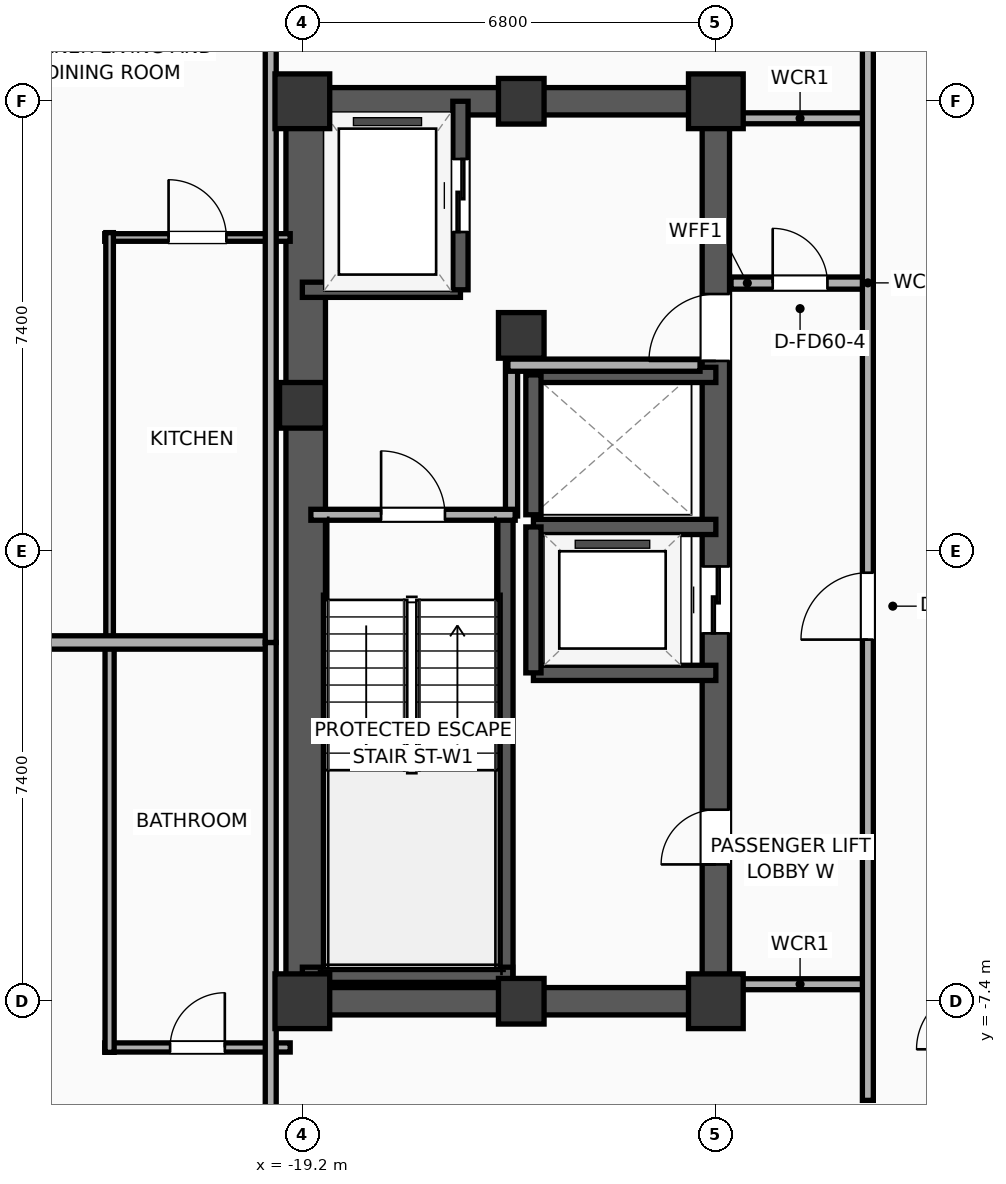
"""IFC4 building model, lengths in metres.
Left out: names, types, materials, properties, quantities, classifications, styles, units other than length and angle.
Written with IfcOpenShell. Run it as: python <this file> out.ifc"""

import sys

from ifc_helpers import new_model, si_unit, direction, frame, frame_2d, origin, origin_2d, place, context, subcontext, project, spatial, rectangle, extrude, element, fill, save


model = new_model("IFC4")
c1 = context("Model", 3, precision=1e-05, world=origin(), true_north=direction((0.0, 1.0)))
c2 = subcontext(c1, "Body", "Model", "MODEL_VIEW")
j1 = project(units=[si_unit("LENGTHUNIT", "METRE"), si_unit("PLANEANGLEUNIT", "RADIAN")], contexts=[c1])
p1 = place(None, origin())
s1 = spatial("IfcSite", under=j1, at=p1, CompositionType="ELEMENT")
p2 = place(p1, origin())
s2 = spatial("IfcBuilding", under=s1, at=p2, CompositionType="ELEMENT")
p3 = place(p2, frame((0.0, 0.0, 163.8)))
s3 = spatial("IfcBuildingStorey", under=s2, at=p3, CompositionType="ELEMENT", Elevation=163.8)
p4 = place(p3, frame((-19.2, -7.4, 0.0), z_axis=(0.0, 0.0, 1.0), x_axis=(1.0, 0.0, 0.0)))
e1 = element("IfcColumn", 1, at=p4, inside=s3, PredefinedType="COLUMN", context=c2, shape_type="SweptSolid", body=[
    extrude(rectangle(XDim=0.9, YDim=0.9, at=origin_2d()), origin(), (0.0, 0.0, 1.0), 3.9),
])
p5 = place(p3, frame((-19.2, 2.4, 0.0), z_axis=(0.0, 0.0, 1.0), x_axis=(1.0, 0.0, 0.0)))
e2 = element("IfcColumn", 2, at=p5, inside=s3, PredefinedType="COLUMN", context=c2, shape_type="SweptSolid", body=[
    extrude(rectangle(XDim=0.75, YDim=0.75, at=origin_2d()), origin(), (0.0, 0.0, 1.0), 3.9),
])
p6 = place(p3, frame((-19.2, 7.4, 0.0), z_axis=(0.0, 0.0, 1.0), x_axis=(1.0, 0.0, 0.0)))
e3 = element("IfcColumn", 3, at=p6, inside=s3, PredefinedType="COLUMN", context=c2, shape_type="SweptSolid", body=[
    extrude(rectangle(XDim=0.9, YDim=0.9, at=origin_2d()), origin(), (0.0, 0.0, 1.0), 3.9),
])
for number, where, z_axis, x_axis in (
    (4, (-15.6, -7.4, 0.0), (0.0, 0.0, 1.0), (1.0, 0.0, 0.0)),
    (5, (-15.6, 7.4, 0.0), (0.0, 0.0, 1.0), (1.0, 0.0, 0.0)),
):
    element("IfcColumn", number, at=place(p3, frame(where, z_axis=z_axis, x_axis=x_axis)), inside=s3, PredefinedType="COLUMN", context=c2, shape_type="SweptSolid", body=[
        extrude(rectangle(XDim=0.75, YDim=0.75, at=origin_2d()), origin(), (0.0, 0.0, 1.0), 3.9),
    ])
p7 = place(p3, frame((-12.4, -7.4, 0.0), z_axis=(0.0, 0.0, 1.0), x_axis=(1.0, 0.0, 0.0)))
e6 = element("IfcColumn", 6, at=p7, inside=s3, PredefinedType="COLUMN", context=c2, shape_type="SweptSolid", body=[
    extrude(rectangle(XDim=0.9, YDim=0.9, at=origin_2d()), origin(), (0.0, 0.0, 1.0), 3.9),
])
p8 = place(p3, frame((-15.6, 3.55, 0.0), z_axis=(0.0, 0.0, 1.0), x_axis=(1.0, 0.0, 0.0)))
e7 = element("IfcColumn", 7, at=p8, inside=s3, PredefinedType="COLUMN", context=c2, shape_type="SweptSolid", body=[
    extrude(rectangle(XDim=0.75, YDim=0.75, at=origin_2d()), origin(), (0.0, 0.0, 1.0), 3.9),
])
p9 = place(p3, frame((-12.4, 7.4, 0.0), z_axis=(0.0, 0.0, 1.0), x_axis=(1.0, 0.0, 0.0)))
e8 = element("IfcColumn", 8, at=p9, inside=s3, PredefinedType="COLUMN", context=c2, shape_type="SweptSolid", body=[
    extrude(rectangle(XDim=0.9, YDim=0.9, at=origin_2d()), origin(), (0.0, 0.0, 1.0), 3.9),
])
for number, where, z_axis, x_axis in (
    (9, (-19.425, -7.4, 0.0), (0.0, 0.0, 1.0), (1.0, 0.0, 0.0)),
    (10, (-19.425, 7.4, 0.0), (0.0, 0.0, 1.0), (1.0, 0.0, 0.0)),
):
    element("IfcWall", number, at=place(p3, frame(where, z_axis=z_axis, x_axis=x_axis)), inside=s3, PredefinedType="SHEAR", context=c2, shape_type="SweptSolid", body=[
        extrude(rectangle(XDim=7.25, YDim=0.45, at=frame_2d((3.625, 0.0))), origin(), (0.0, 0.0, 1.0), 3.65),
    ])
p10 = place(p3, frame((-19.145, -7.4, 0.0), z_axis=(0.0, 0.0, 1.0), x_axis=(0.0, 1.0, 0.0)))
e11 = element("IfcWall", 11, at=p10, inside=s3, PredefinedType="SHEAR", context=c2, shape_type="SweptSolid", body=[
    extrude(rectangle(XDim=14.8, YDim=0.65, at=frame_2d((7.4, 0.0))), origin(), (0.0, 0.0, 1.0), 3.65),
])
p11 = place(p3, frame((-12.4, -7.4, 0.0), z_axis=(0.0, 0.0, 1.0), x_axis=(0.0, 1.0, 0.0)))
e12 = element("IfcWall", 12, at=p11, inside=s3, PredefinedType="SHEAR", context=c2, shape_type="SweptSolid", body=[
    extrude(rectangle(XDim=14.8, YDim=0.45, at=frame_2d((7.4, 0.0))), origin(), (0.0, 0.0, 1.0), 3.65),
])
p12 = place(p11, frame((6.05, 0.0, 0.0)))
e13 = element("IfcOpeningElement", 13, at=p12, cuts=e12, PredefinedType="OPENING", context=c2, shape_type="SweptSolid", body=[
    extrude(rectangle(XDim=1.1, YDim=2.05, at=frame_2d((0.55, 1.025))), frame((0.0, 0.235, 0.0), z_axis=(0.0, -1.0, 0.0), x_axis=(1.0, 0.0, 0.0)), (0.0, 0.0, 1.0), 0.47),
])
p13 = place(p11, frame((10.53, 0.0, 0.0)))
e14 = element("IfcOpeningElement", 14, at=p13, cuts=e12, PredefinedType="OPENING", context=c2, shape_type="SweptSolid", body=[
    extrude(rectangle(XDim=1.1, YDim=2.05, at=frame_2d((0.55, 1.025))), frame((0.0, 0.235, 0.0), z_axis=(0.0, -1.0, 0.0), x_axis=(1.0, 0.0, 0.0)), (0.0, 0.0, 1.0), 0.47),
])
p14 = place(p11, frame((2.25, 0.0, 0.0)))
e15 = element("IfcOpeningElement", 15, at=p14, cuts=e12, PredefinedType="OPENING", context=c2, shape_type="SweptSolid", body=[
    extrude(rectangle(XDim=0.9, YDim=2.05, at=frame_2d((0.45, 1.025))), frame((0.0, 0.235, 0.0), z_axis=(0.0, -1.0, 0.0), x_axis=(1.0, 0.0, 0.0)), (0.0, 0.0, 1.0), 0.47),
])
p15 = place(p3, frame((-15.86, -7.085, 0.0), z_axis=(0.0, 0.0, 1.0), x_axis=(0.0, 1.0, 0.0)))
e16 = element("IfcWall", 16, at=p15, inside=s3, PredefinedType="SOLIDWALL", context=c2, shape_type="SweptSolid", body=[
    extrude(rectangle(XDim=7.685, YDim=0.25, at=frame_2d((3.843, 0.0))), origin(), (0.0, 0.0, 1.0), 3.65),
])
p16 = place(p3, frame((-19.2, -6.965, 0.0), z_axis=(0.0, 0.0, 1.0), x_axis=(1.0, 0.0, 0.0)))
e17 = element("IfcWall", 17, at=p16, inside=s3, PredefinedType="SOLIDWALL", context=c2, shape_type="SweptSolid", body=[
    extrude(rectangle(XDim=3.46, YDim=0.25, at=frame_2d((1.73, 0.0))), origin(), (0.0, 0.0, 1.0), 3.65),
])
p17 = place(p3, frame((-19.2, 4.3, 0.0), z_axis=(0.0, 0.0, 1.0), x_axis=(1.0, 0.0, 0.0)))
e18 = element("IfcWall", 18, at=p17, inside=s3, PredefinedType="SOLIDWALL", context=c2, shape_type="SweptSolid", body=[
    extrude(rectangle(XDim=2.6, YDim=0.25, at=frame_2d((1.3, 0.0))), origin(), (0.0, 0.0, 1.0), 3.65),
])
p18 = place(p3, frame((-16.6, 4.3, 0.0), z_axis=(0.0, 0.0, 1.0), x_axis=(0.0, 1.0, 0.0)))
e19 = element("IfcWall", 19, at=p18, inside=s3, PredefinedType="SOLIDWALL", context=c2, shape_type="SweptSolid", body=[
    extrude(rectangle(XDim=3.1, YDim=0.25, at=frame_2d((1.55, 0.0))), origin(), (0.0, 0.0, 1.0), 3.65),
])
p19 = place(p18, frame((0.95, 0.0, 0.0)))
e20 = element("IfcOpeningElement", 20, at=p19, cuts=e19, PredefinedType="OPENING", context=c2, shape_type="SweptSolid", body=[
    extrude(rectangle(XDim=1.2, YDim=2.05, at=frame_2d((0.6, 1.025))), frame((0.0, 0.135, 0.0), z_axis=(0.0, -1.0, 0.0), x_axis=(1.0, 0.0, 0.0)), (0.0, 0.0, 1.0), 0.27),
])
for number, where, z_axis, x_axis in (
    (21, (-15.4, -2.0, 0.0), (0.0, 0.0, 1.0), (1.0, 0.0, 0.0)),
    (22, (-12.4, 0.4, 0.0), (0.0, 0.0, 1.0), (-1.0, 0.0, 0.0)),
):
    element("IfcWall", number, at=place(p3, frame(where, z_axis=z_axis, x_axis=x_axis)), inside=s3, PredefinedType="SOLIDWALL", context=c2, shape_type="SweptSolid", body=[
        extrude(rectangle(XDim=3.0, YDim=0.25, at=frame_2d((1.5, 0.0))), origin(), (0.0, 0.0, 1.0), 3.65),
    ])
p20 = place(p3, frame((-15.4, 0.4, 0.0), z_axis=(0.0, 0.0, 1.0), x_axis=(0.0, -1.0, 0.0)))
e23 = element("IfcWall", 23, at=p20, inside=s3, PredefinedType="SOLIDWALL", context=c2, shape_type="SweptSolid", body=[
    extrude(rectangle(XDim=2.4, YDim=0.25, at=frame_2d((1.2, 0.0))), origin(), (0.0, 0.0, 1.0), 3.65),
])
p21 = place(p3, frame((-12.4, 2.9, 0.0), z_axis=(0.0, 0.0, 1.0), x_axis=(-1.0, 0.0, 0.0)))
e24 = element("IfcWall", 24, at=p21, inside=s3, PredefinedType="SOLIDWALL", context=c2, shape_type="SweptSolid", body=[
    extrude(rectangle(XDim=3.0, YDim=0.25, at=frame_2d((1.5, 0.0))), origin(), (0.0, 0.0, 1.0), 3.65),
])
p22 = place(p3, frame((-15.4, 2.9, 0.0), z_axis=(0.0, 0.0, 1.0), x_axis=(0.0, -1.0, 0.0)))
e25 = element("IfcWall", 25, at=p22, inside=s3, PredefinedType="SOLIDWALL", context=c2, shape_type="SweptSolid", body=[
    extrude(rectangle(XDim=2.3, YDim=0.25, at=frame_2d((1.15, 0.0))), origin(), (0.0, 0.0, 1.0), 3.65),
])
p23 = place(p3, frame((-15.76, 0.58, 0.0), z_axis=(0.0, 0.0, 1.0), x_axis=(0.0, 1.0, 0.0)))
e26 = element("IfcWall", 26, at=p23, inside=s3, PredefinedType="PARTITIONING", context=c2, shape_type="SweptSolid", body=[
    extrude(rectangle(XDim=2.52, YDim=0.2, at=frame_2d((1.26, 0.0))), origin(), (0.0, 0.0, 1.0), 3.65),
])
p24 = place(p3, frame((-15.82, 3.06, 0.0), z_axis=(0.0, 0.0, 1.0), x_axis=(1.0, 0.0, 0.0)))
e27 = element("IfcWall", 27, at=p24, inside=s3, PredefinedType="PARTITIONING", context=c2, shape_type="SweptSolid", body=[
    extrude(rectangle(XDim=3.16, YDim=0.2, at=frame_2d((1.58, 0.0))), origin(), (0.0, 0.0, 1.0), 3.65),
])
p25 = place(p3, frame((-19.06, 0.6, 0.0), z_axis=(0.0, 0.0, 1.0), x_axis=(1.0, 0.0, 0.0)))
e28 = element("IfcWall", 28, at=p25, inside=s3, PredefinedType="PARTITIONING", context=c2, shape_type="SweptSolid", body=[
    extrude(rectangle(XDim=3.36, YDim=0.18, at=frame_2d((1.68, 0.0))), origin(), (0.0, 0.0, 1.0), 3.65),
])
p26 = place(p25, frame((1.155, 0.0, 0.0)))
e29 = element("IfcOpeningElement", 29, at=p26, cuts=e28, PredefinedType="OPENING", context=c2, shape_type="SweptSolid", body=[
    extrude(rectangle(XDim=1.05, YDim=2.05, at=frame_2d((0.525, 1.025))), frame((0.0, 0.1, 0.0), z_axis=(0.0, -1.0, 0.0), x_axis=(1.0, 0.0, 0.0)), (0.0, 0.0, 1.0), 0.2),
])
p27 = place(p3, frame((-12.15, 4.41, 0.0), z_axis=(0.0, 0.0, 1.0), x_axis=(1.0, 0.0, 0.0)))
e30 = element("IfcWall", 30, at=p27, inside=s3, PredefinedType="PARTITIONING", context=c2, shape_type="SweptSolid", body=[
    extrude(rectangle(XDim=2.27, YDim=0.2, at=frame_2d((1.135, 0.0))), origin(), (0.0, 0.0, 1.0), 3.65),
])
p28 = place(p27, frame((0.685, 0.0, 0.0)))
e31 = element("IfcOpeningElement", 31, at=p28, cuts=e30, PredefinedType="OPENING", context=c2, shape_type="SweptSolid", body=[
    extrude(rectangle(XDim=0.9, YDim=2.05, at=frame_2d((0.45, 1.025))), frame((0.0, 0.11, 0.0), z_axis=(0.0, -1.0, 0.0), x_axis=(1.0, 0.0, 0.0)), (0.0, 0.0, 1.0), 0.22),
])
for number, where, z_axis, x_axis in (
    (32, (-12.15, 7.12, 0.0), (0.0, 0.0, 1.0), (1.0, 0.0, 0.0)),
    (33, (-12.15, -7.12, 0.0), (0.0, 0.0, 1.0), (1.0, 0.0, 0.0)),
):
    element("IfcWall", number, at=place(p3, frame(where, z_axis=z_axis, x_axis=x_axis)), inside=s3, PredefinedType="PARTITIONING", context=c2, shape_type="SweptSolid", body=[
        extrude(rectangle(XDim=2.27, YDim=0.18, at=frame_2d((1.135, 0.0))), origin(), (0.0, 0.0, 1.0), 3.65),
    ])
p29 = place(p3, frame((-9.9, -9.03, 0.0), z_axis=(0.0, 0.0, 1.0), x_axis=(0.0, 1.0, 0.0)))
e34 = element("IfcWall", 34, at=p29, inside=s3, PredefinedType="PARTITIONING", context=c2, shape_type="SweptSolid", body=[
    extrude(rectangle(XDim=18.06, YDim=0.18, at=frame_2d((9.03, 0.0))), origin(), (0.0, 0.0, 1.0), 3.65),
])
p30 = place(p29, frame((7.577, 0.0, 0.0)))
e35 = element("IfcOpeningElement", 35, at=p30, cuts=e34, PredefinedType="OPENING", context=c2, shape_type="SweptSolid", body=[
    extrude(rectangle(XDim=1.1, YDim=2.05, at=frame_2d((0.55, 1.025))), frame((0.0, 0.1, 0.0), z_axis=(0.0, -1.0, 0.0), x_axis=(1.0, 0.0, 0.0)), (0.0, 0.0, 1.0), 0.2),
])
p31 = place(p3, frame((-22.45, -8.16, 0.0), z_axis=(0.0, 0.0, 1.0), x_axis=(1.0, 0.0, 0.0)))
e36 = element("IfcWall", 36, at=p31, inside=s3, PredefinedType="PLUMBINGWALL", context=c2, shape_type="SweptSolid", body=[
    extrude(rectangle(XDim=3.05, YDim=0.15, at=frame_2d((1.525, 0.0))), origin(), (0.0, 0.0, 1.0), 3.04),
])
p32 = place(p31, frame((1.075, 0.0, 0.0)))
e37 = element("IfcOpeningElement", 37, at=p32, cuts=e36, PredefinedType="OPENING", context=c2, shape_type="SweptSolid", body=[
    extrude(rectangle(XDim=0.9, YDim=2.05, at=frame_2d((0.45, 1.025))), frame((0.0, 0.085, 0.0), z_axis=(0.0, -1.0, 0.0), x_axis=(1.0, 0.0, 0.0)), (0.0, 0.0, 1.0), 0.17),
])
p33 = place(p3, frame((-22.37, -8.24, 0.0), z_axis=(0.0, 0.0, 1.0), x_axis=(0.0, 1.0, 0.0)))
e38 = element("IfcWall", 38, at=p33, inside=s3, PredefinedType="PLUMBINGWALL", context=c2, shape_type="SweptSolid", body=[
    extrude(rectangle(XDim=6.72, YDim=0.15, at=frame_2d((3.36, 0.0))), origin(), (0.0, 0.0, 1.0), 3.65),
])
p34 = place(p3, frame((-22.45, 5.16, 0.0), z_axis=(0.0, 0.0, 1.0), x_axis=(1.0, 0.0, 0.0)))
e39 = element("IfcWall", 39, at=p34, inside=s3, PredefinedType="PARTITIONING", context=c2, shape_type="SweptSolid", body=[
    extrude(rectangle(XDim=3.05, YDim=0.125, at=frame_2d((1.525, 0.0))), origin(), (0.0, 0.0, 1.0), 3.65),
])
p35 = place(p34, frame((1.05, 0.0, 0.0)))
e40 = element("IfcOpeningElement", 40, at=p35, cuts=e39, PredefinedType="OPENING", context=c2, shape_type="SweptSolid", body=[
    extrude(rectangle(XDim=0.95, YDim=2.05, at=frame_2d((0.475, 1.025))), frame((0.0, 0.073, 0.0), z_axis=(0.0, -1.0, 0.0), x_axis=(1.0, 0.0, 0.0)), (0.0, 0.0, 1.0), 0.145),
])
p36 = place(p3, frame((-22.37, -1.48, 0.0), z_axis=(0.0, 0.0, 1.0), x_axis=(0.0, 1.0, 0.0)))
e41 = element("IfcWall", 41, at=p36, inside=s3, PredefinedType="PARTITIONING", context=c2, shape_type="SweptSolid", body=[
    extrude(rectangle(XDim=6.72, YDim=0.125, at=frame_2d((3.36, 0.0))), origin(), (0.0, 0.0, 1.0), 3.65),
])
p37 = place(p3, frame((-19.72, -1.5, 0.0), z_axis=(0.0, 0.0, 1.0), x_axis=(-1.0, 0.0, 0.0)))
e42 = element("IfcWall", 42, at=p37, inside=s3, PredefinedType="PARTITIONING", context=c2, shape_type="SweptSolid", body=[
    extrude(rectangle(XDim=13.179, YDim=0.22, at=frame_2d((6.589, 0.0))), origin(), (0.0, 0.0, 1.0), 3.65),
])
p38 = place(p3, frame((-19.72, -22.678, 0.0), z_axis=(0.0, 0.0, 1.0), x_axis=(0.0, 1.0, 0.0)))
e43 = element("IfcWall", 43, at=p38, inside=s3, PredefinedType="PARTITIONING", context=c2, shape_type="SweptSolid", body=[
    extrude(rectangle(XDim=21.178, YDim=0.18, at=frame_2d((10.589, 0.0))), origin(), (0.0, 0.0, 1.0), 3.65),
])
p39 = place(p38, frame((12.547, 0.0, 0.0)))
e44 = element("IfcOpeningElement", 44, at=p39, cuts=e43, PredefinedType="OPENING", context=c2, shape_type="SweptSolid", body=[
    extrude(rectangle(XDim=0.9, YDim=2.05, at=frame_2d((0.45, 1.025))), frame((0.0, 0.1, 0.0), z_axis=(0.0, -1.0, 0.0), x_axis=(1.0, 0.0, 0.0)), (0.0, 0.0, 1.0), 0.2),
])
p40 = place(p3, frame((-19.72, -1.5, 0.0), z_axis=(0.0, 0.0, 1.0), x_axis=(0.0, 1.0, 0.0)))
e45 = element("IfcWall", 45, at=p40, inside=s3, PredefinedType="PARTITIONING", context=c2, shape_type="SweptSolid", body=[
    extrude(rectangle(XDim=19.505, YDim=0.18, at=frame_2d((9.752, 0.0))), origin(), (0.0, 0.0, 1.0), 3.04),
])
p41 = place(p40, frame((10.73, 0.0, 0.0)))
e46 = element("IfcOpeningElement", 46, at=p41, cuts=e45, PredefinedType="OPENING", context=c2, shape_type="SweptSolid", body=[
    extrude(rectangle(XDim=0.9, YDim=2.05, at=frame_2d((0.45, 1.025))), frame((0.0, 0.1, 0.0), z_axis=(0.0, -1.0, 0.0), x_axis=(1.0, 0.0, 0.0)), (0.0, 0.0, 1.0), 0.2),
])
p42 = place(p19, origin())
e47 = element("IfcDoor", 47, at=p42, inside=s3, OperationType="SLIDING_TO_LEFT", PredefinedType="DOOR", context=c2, shape_type="SweptSolid", body=[
    extrude(rectangle(XDim=1.2, YDim=2.05, at=frame_2d((0.6, 1.025))), frame((0.0, 0.025, 0.0), z_axis=(0.0, -1.0, 0.0), x_axis=(1.0, 0.0, 0.0)), (0.0, 0.0, 1.0), 0.05),
])
fill(e20, e47)
p43 = place(p12, origin())
e48 = element("IfcDoor", 48, at=p43, inside=s3, OperationType="SLIDING_TO_LEFT", PredefinedType="DOOR", context=c2, shape_type="SweptSolid", body=[
    extrude(rectangle(XDim=1.1, YDim=2.05, at=frame_2d((0.55, 1.025))), frame((0.0, 0.025, 0.0), z_axis=(0.0, -1.0, 0.0), x_axis=(1.0, 0.0, 0.0)), (0.0, 0.0, 1.0), 0.05),
])
fill(e13, e48)
p44 = place(p26, origin())
e49 = element("IfcDoor", 49, at=p44, inside=s3, OperationType="SINGLE_SWING_LEFT", PredefinedType="DOOR", context=c2, shape_type="SweptSolid", body=[
    extrude(rectangle(XDim=1.05, YDim=2.05, at=frame_2d((0.525, 1.025))), frame((0.0, 0.025, 0.0), z_axis=(0.0, -1.0, 0.0), x_axis=(1.0, 0.0, 0.0)), (0.0, 0.0, 1.0), 0.05),
])
fill(e29, e49)
p45 = place(p28, origin())
e50 = element("IfcDoor", 50, at=p45, inside=s3, OperationType="SINGLE_SWING_LEFT", PredefinedType="DOOR", context=c2, shape_type="SweptSolid", body=[
    extrude(rectangle(XDim=0.9, YDim=2.05, at=frame_2d((0.45, 1.025))), frame((0.0, 0.025, 0.0), z_axis=(0.0, -1.0, 0.0), x_axis=(1.0, 0.0, 0.0)), (0.0, 0.0, 1.0), 0.05),
])
fill(e31, e50)
p46 = place(p30, origin())
e51 = element("IfcDoor", 51, at=p46, inside=s3, OperationType="SINGLE_SWING_LEFT", PredefinedType="DOOR", context=c2, shape_type="SweptSolid", body=[
    extrude(rectangle(XDim=1.1, YDim=2.05, at=frame_2d((0.55, 1.025))), frame((0.0, 0.025, 0.0), z_axis=(0.0, -1.0, 0.0), x_axis=(1.0, 0.0, 0.0)), (0.0, 0.0, 1.0), 0.05),
])
fill(e35, e51)
p47 = place(p32, origin())
e52 = element("IfcDoor", 52, at=p47, inside=s3, OperationType="SINGLE_SWING_RIGHT", PredefinedType="DOOR", context=c2, shape_type="SweptSolid", body=[
    extrude(rectangle(XDim=0.9, YDim=2.05, at=frame_2d((0.45, 1.025))), frame((0.0, 0.025, 0.0), z_axis=(0.0, -1.0, 0.0), x_axis=(1.0, 0.0, 0.0)), (0.0, 0.0, 1.0), 0.05),
])
fill(e37, e52)
p48 = place(p35, origin())
e53 = element("IfcDoor", 53, at=p48, inside=s3, OperationType="SINGLE_SWING_LEFT", PredefinedType="DOOR", context=c2, shape_type="SweptSolid", body=[
    extrude(rectangle(XDim=0.95, YDim=2.05, at=frame_2d((0.475, 1.025))), frame((0.0, 0.025, 0.0), z_axis=(0.0, -1.0, 0.0), x_axis=(1.0, 0.0, 0.0)), (0.0, 0.0, 1.0), 0.05),
])
fill(e40, e53)
p49 = place(p13, origin())
e54 = element("IfcDoor", 54, at=p49, inside=s3, OperationType="SINGLE_SWING_LEFT", PredefinedType="DOOR", context=c2, shape_type="SweptSolid", body=[
    extrude(rectangle(XDim=1.1, YDim=2.05, at=frame_2d((0.55, 1.025))), frame((0.0, 0.025, 0.0), z_axis=(0.0, -1.0, 0.0), x_axis=(1.0, 0.0, 0.0)), (0.0, 0.0, 1.0), 0.05),
])
fill(e14, e54)
p50 = place(p14, origin())
e55 = element("IfcDoor", 55, at=p50, inside=s3, OperationType="SINGLE_SWING_LEFT", PredefinedType="DOOR", context=c2, shape_type="SweptSolid", body=[
    extrude(rectangle(XDim=0.9, YDim=2.05, at=frame_2d((0.45, 1.025))), frame((0.0, 0.025, 0.0), z_axis=(0.0, -1.0, 0.0), x_axis=(1.0, 0.0, 0.0)), (0.0, 0.0, 1.0), 0.05),
])
fill(e15, e55)
save(model, sys.argv[1])
